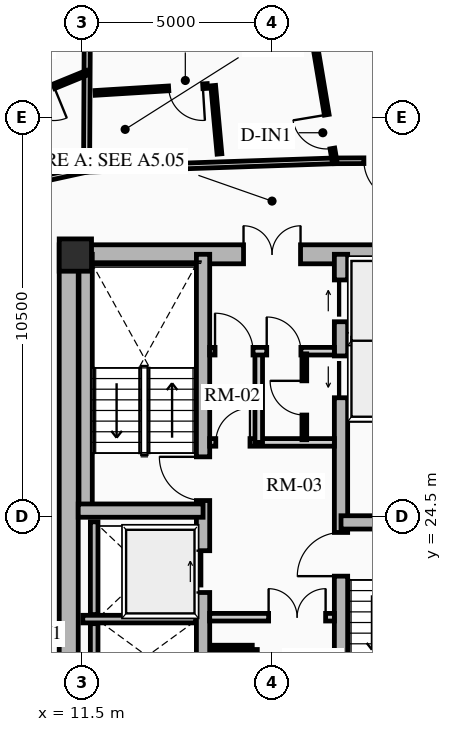
"""IFC4 building model, lengths in metres.
Left out: names, types, materials, properties, quantities, classifications, styles, units other than length and angle.
Written with IfcOpenShell. Run it as: python <this file> out.ifc"""

import sys

from ifc_helpers import new_model, si_unit, direction, frame, frame_2d, origin, origin_2d, place, context, subcontext, project, spatial, rectangle, extrude, source, transform, mapped, element, fill, save


model = new_model("IFC4")
c1 = context("Model", 3, precision=1e-05, world=origin(), true_north=direction((0.0, 1.0)))
c2 = subcontext(c1, "Body", "Model", "MODEL_VIEW")
j1 = project(units=[si_unit("LENGTHUNIT", "METRE"), si_unit("PLANEANGLEUNIT", "RADIAN")], contexts=[c1])
p1 = place(None, origin())
s1 = spatial("IfcSite", under=j1, at=p1, CompositionType="ELEMENT")
p2 = place(p1, origin())
s2 = spatial("IfcBuilding", under=s1, at=p2, CompositionType="ELEMENT")
p3 = place(p2, frame((0.0, 0.0, 62.74)))
s3 = spatial("IfcBuildingStorey", under=s2, at=p3, CompositionType="ELEMENT", Elevation=62.74)
p4 = place(p3, frame((11.15, 17.35, 0.0), z_axis=(0.0, 0.0, 1.0), x_axis=(0.0, 1.0, 0.0)))
e1 = element("IfcWall", 1, at=p4, inside=s3, PredefinedType="SHEAR", context=c2, shape_type="SweptSolid", body=[
    extrude(rectangle(XDim=14.3, YDim=0.5, at=frame_2d((7.15, 0.0))), origin(), (0.0, 0.0, 1.0), 2.91),
])
p5 = place(p3, frame((11.15, 31.4, 0.0), z_axis=(0.0, 0.0, 1.0), x_axis=(1.0, 0.0, 0.0)))
e2 = element("IfcWall", 2, at=p5, inside=s3, PredefinedType="SHEAR", context=c2, shape_type="SweptSolid", body=[
    extrude(rectangle(XDim=10.7, YDim=0.5, at=frame_2d((5.35, 0.0))), origin(), (0.0, 0.0, 1.0), 2.91),
])
m1 = source(origin(), c2, "Body", "SweptSolid", [
    extrude(rectangle(XDim=1.5, YDim=2.02, at=frame_2d((0.75, 1.01))), frame((0.0, 0.26, 0.0), z_axis=(0.0, -1.0, 0.0), x_axis=(1.0, 0.0, 0.0)), (0.0, 0.0, 1.0), 0.52),
])
p6 = place(p5, frame((4.6, 0.0, 0.0)))
e3 = element("IfcOpeningElement", 3, at=p6, cuts=e2, PredefinedType="OPENING", context=c2, shape_type="MappedRepresentation", body=[
    mapped(m1, transform((0.0, 0.0, 0.0), x_axis=(1.0, 0.0, 0.0), y_axis=(0.0, 1.0, 0.0), z_axis=(0.0, 0.0, 1.0), scale=1.0)),
])
p7 = place(p3, frame((14.685, 17.6, 0.0), z_axis=(0.0, 0.0, 1.0), x_axis=(0.0, 1.0, 0.0)))
e4 = element("IfcWall", 4, at=p7, inside=s3, PredefinedType="SHEAR", context=c2, shape_type="SweptSolid", body=[
    extrude(rectangle(XDim=13.8, YDim=0.35, at=frame_2d((6.9, 0.0))), origin(), (0.0, 0.0, 1.0), 2.91),
])
m2 = source(origin(), c2, "Body", "SweptSolid", [
    extrude(rectangle(XDim=1.1, YDim=2.015, at=frame_2d((0.55, 1.007))), frame((0.0, 0.185, 0.0), z_axis=(0.0, -1.0, 0.0), x_axis=(1.0, 0.0, 0.0)), (0.0, 0.0, 1.0), 0.37),
])
p8 = place(p7, frame((4.9, 0.0, 0.0)))
e5 = element("IfcOpeningElement", 5, at=p8, cuts=e4, PredefinedType="OPENING", context=c2, shape_type="MappedRepresentation", body=[
    mapped(m2, transform((0.0, 0.0, 0.0), x_axis=(1.0, 0.0, 0.0), y_axis=(0.0, 1.0, 0.0), z_axis=(0.0, 0.0, 1.0), scale=1.0)),
])
m3 = source(origin(), c2, "Body", "SweptSolid", [
    extrude(rectangle(XDim=1.15, YDim=2.02, at=frame_2d((0.575, 1.01))), frame((0.0, 0.185, 0.0), z_axis=(0.0, -1.0, 0.0), x_axis=(1.0, 0.0, 0.0)), (0.0, 0.0, 1.0), 0.37),
])
p9 = place(p7, frame((7.32, 0.0, 0.0)))
e6 = element("IfcOpeningElement", 6, at=p9, cuts=e4, PredefinedType="OPENING", context=c2, shape_type="MappedRepresentation", body=[
    mapped(m3, transform((0.0, 0.0, 0.0), x_axis=(1.0, 0.0, 0.0), y_axis=(0.0, 1.0, 0.0), z_axis=(0.0, 0.0, 1.0), scale=1.0)),
])
p10 = place(p3, frame((18.315, 17.6, 0.0), z_axis=(0.0, 0.0, 1.0), x_axis=(0.0, 1.0, 0.0)))
e7 = element("IfcWall", 7, at=p10, inside=s3, PredefinedType="SHEAR", context=c2, shape_type="SweptSolid", body=[
    extrude(rectangle(XDim=13.8, YDim=0.35, at=frame_2d((6.9, 0.0))), origin(), (0.0, 0.0, 1.0), 2.91),
])
p11 = place(p10, frame((10.025, 0.0, 0.0)))
e8 = element("IfcOpeningElement", 8, at=p11, cuts=e7, PredefinedType="OPENING", context=c2, shape_type="MappedRepresentation", body=[
    mapped(m2, transform((0.0, 0.0, 0.0), x_axis=(1.0, 0.0, 0.0), y_axis=(0.0, 1.0, 0.0), z_axis=(0.0, 0.0, 1.0), scale=1.0)),
])
p12 = place(p10, frame((12.025, 0.0, 0.0)))
e9 = element("IfcOpeningElement", 9, at=p12, cuts=e7, PredefinedType="OPENING", context=c2, shape_type="MappedRepresentation", body=[
    mapped(m2, transform((0.0, 0.0, 0.0), x_axis=(1.0, 0.0, 0.0), y_axis=(0.0, 1.0, 0.0), z_axis=(0.0, 0.0, 1.0), scale=1.0)),
])
p13 = place(p10, frame((5.33, 0.0, 0.0)))
e10 = element("IfcOpeningElement", 10, at=p13, cuts=e7, PredefinedType="OPENING", context=c2, shape_type="MappedRepresentation", body=[
    mapped(m3, transform((0.0, 0.0, 0.0), x_axis=(1.0, 0.0, 0.0), y_axis=(0.0, 1.0, 0.0), z_axis=(0.0, 0.0, 1.0), scale=1.0)),
])
p14 = place(p3, frame((11.595, 24.655, 0.0), z_axis=(0.0, 0.0, 1.0), x_axis=(0.0, 1.0, 0.0)))
e11 = element("IfcWall", 11, at=p14, inside=s3, PredefinedType="SHEAR", context=c2, shape_type="SweptSolid", body=[
    extrude(rectangle(XDim=6.745, YDim=0.35, at=frame_2d((3.373, 0.0))), origin(), (0.0, 0.0, 1.0), 2.91),
])
for number, where, z_axis, x_axis in (
    (12, (11.4, 24.655, 0.0), (0.0, 0.0, 1.0), (1.0, 0.0, 0.0)),
    (13, (18.315, 24.345, 0.0), (0.0, 0.0, 1.0), (1.0, 0.0, 0.0)),
):
    element("IfcWall", number, at=place(p3, frame(where, z_axis=z_axis, x_axis=x_axis)), inside=s3, PredefinedType="SHEAR", context=c2, shape_type="SweptSolid", body=[
        extrude(rectangle(XDim=3.285, YDim=0.35, at=frame_2d((1.643, 0.0))), origin(), (0.0, 0.0, 1.0), 2.91),
    ])
p15 = place(p3, frame((11.325, 31.38, 0.0), z_axis=(0.0, 0.0, 1.0), x_axis=(1.0, 0.0, 0.0)))
e14 = element("IfcColumn", 14, at=p15, inside=s3, PredefinedType="COLUMN", context=c2, shape_type="SweptSolid", body=[
    extrude(rectangle(XDim=0.85, YDim=0.85, at=origin_2d()), origin(), (0.0, 0.0, 1.0), 2.91),
])
p16 = place(p3, frame((11.52, 21.8, 0.0), z_axis=(0.0, 0.0, 1.0), x_axis=(1.0, 0.0, 0.0)))
e15 = element("IfcWall", 15, at=p16, inside=s3, PredefinedType="SHEAR", context=c2, shape_type="SweptSolid", body=[
    extrude(rectangle(XDim=2.97, YDim=0.2, at=frame_2d((1.485, 0.0))), origin(), (0.0, 0.0, 1.0), 2.91),
])
p17 = place(p3, frame((11.82, 21.92, 0.0), z_axis=(0.0, 0.0, 1.0), x_axis=(0.0, 1.0, 0.0)))
e16 = element("IfcWall", 16, at=p17, inside=s3, PredefinedType="SHEAR", context=c2, shape_type="SweptSolid", body=[
    extrude(rectangle(XDim=2.44, YDim=0.2, at=frame_2d((1.22, 0.0))), origin(), (0.0, 0.0, 1.0), 2.91),
])
p18 = place(p3, frame((11.82, 19.945, 0.0), z_axis=(0.0, 0.0, 1.0), x_axis=(0.0, 1.0, 0.0)))
e17 = element("IfcWall", 17, at=p18, inside=s3, PredefinedType="SHEAR", context=c2, shape_type="SweptSolid", body=[
    extrude(rectangle(XDim=1.735, YDim=0.2, at=frame_2d((0.867, 0.0))), origin(), (0.0, 0.0, 1.0), 2.91),
])
for number, where, z_axis, x_axis in (
    (18, (18.51, 27.13, 0.0), (0.0, 0.0, 1.0), (1.0, 0.0, 0.0)),
    (19, (18.51, 29.175, 0.0), (0.0, 0.0, 1.0), (1.0, 0.0, 0.0)),
):
    element("IfcWall", number, at=place(p3, frame(where, z_axis=z_axis, x_axis=x_axis)), inside=s3, PredefinedType="SHEAR", context=c2, shape_type="SweptSolid", body=[
        extrude(rectangle(XDim=2.97, YDim=0.2, at=frame_2d((1.485, 0.0))), origin(), (0.0, 0.0, 1.0), 2.91),
    ])
p19 = place(p3, frame((14.86, 21.85, 0.0), z_axis=(0.0, 0.0, 1.0), x_axis=(1.0, 0.0, 0.0)))
e20 = element("IfcWall", 20, at=p19, inside=s3, PredefinedType="PARTITIONING", context=c2, shape_type="SweptSolid", body=[
    extrude(rectangle(XDim=3.28, YDim=0.2, at=frame_2d((1.64, 0.0))), origin(), (0.0, 0.0, 1.0), 2.555),
])
m4 = source(origin(), c2, "Body", "SweptSolid", [
    extrude(rectangle(XDim=1.5, YDim=2.02, at=frame_2d((0.75, 1.01))), frame((0.0, 0.11, 0.0), z_axis=(0.0, -1.0, 0.0), x_axis=(1.0, 0.0, 0.0)), (0.0, 0.0, 1.0), 0.22),
])
p20 = place(p19, frame((1.55, 0.0, 0.0)))
e21 = element("IfcOpeningElement", 21, at=p20, cuts=e20, PredefinedType="OPENING", context=c2, shape_type="MappedRepresentation", body=[
    mapped(m4, transform((0.0, 0.0, 0.0), x_axis=(1.0, 0.0, 0.0), y_axis=(0.0, 1.0, 0.0), z_axis=(0.0, 0.0, 1.0), scale=1.0)),
])
p21 = place(p3, frame((14.86, 26.45, 0.0), z_axis=(0.0, 0.0, 1.0), x_axis=(1.0, 0.0, 0.0)))
e22 = element("IfcWall", 22, at=p21, inside=s3, PredefinedType="PARTITIONING", context=c2, shape_type="SweptSolid", body=[
    extrude(rectangle(XDim=3.28, YDim=0.2, at=frame_2d((1.64, 0.0))), origin(), (0.0, 0.0, 1.0), 2.555),
])
m5 = source(origin(), c2, "Body", "SweptSolid", [
    extrude(rectangle(XDim=0.9, YDim=2.005, at=frame_2d((0.45, 1.002))), frame((0.0, 0.11, 0.0), z_axis=(0.0, -1.0, 0.0), x_axis=(1.0, 0.0, 0.0)), (0.0, 0.0, 1.0), 0.22),
])
p22 = place(p21, frame((0.16, 0.0, 0.0)))
e23 = element("IfcOpeningElement", 23, at=p22, cuts=e22, PredefinedType="OPENING", context=c2, shape_type="MappedRepresentation", body=[
    mapped(m5, transform((0.0, 0.0, 0.0), x_axis=(1.0, 0.0, 0.0), y_axis=(0.0, 1.0, 0.0), z_axis=(0.0, 0.0, 1.0), scale=1.0)),
])
p23 = place(p3, frame((16.15, 26.45, 0.0), z_axis=(0.0, 0.0, 1.0), x_axis=(0.0, 1.0, 0.0)))
e24 = element("IfcWall", 24, at=p23, inside=s3, PredefinedType="PARTITIONING", context=c2, shape_type="SweptSolid", body=[
    extrude(rectangle(XDim=2.4, YDim=0.2, at=frame_2d((1.2, 0.0))), origin(), (0.0, 0.0, 1.0), 2.555),
])
p24 = place(p3, frame((14.86, 28.85, 0.0), z_axis=(0.0, 0.0, 1.0), x_axis=(1.0, 0.0, 0.0)))
e25 = element("IfcWall", 25, at=p24, inside=s3, PredefinedType="PARTITIONING", context=c2, shape_type="SweptSolid", body=[
    extrude(rectangle(XDim=3.28, YDim=0.2, at=frame_2d((1.64, 0.0))), origin(), (0.0, 0.0, 1.0), 2.555),
])
m6 = source(origin(), c2, "Body", "SweptSolid", [
    extrude(rectangle(XDim=1.0, YDim=2.015, at=frame_2d((0.5, 1.007))), frame((0.0, 0.11, 0.0), z_axis=(0.0, -1.0, 0.0), x_axis=(1.0, 0.0, 0.0)), (0.0, 0.0, 1.0), 0.22),
])
p25 = place(p24, frame((0.14, 0.0, 0.0)))
e26 = element("IfcOpeningElement", 26, at=p25, cuts=e25, PredefinedType="OPENING", context=c2, shape_type="MappedRepresentation", body=[
    mapped(m6, transform((0.0, 0.0, 0.0), x_axis=(1.0, 0.0, 0.0), y_axis=(0.0, 1.0, 0.0), z_axis=(0.0, 0.0, 1.0), scale=1.0)),
])
p26 = place(p24, frame((1.5, 0.0, 0.0)))
e27 = element("IfcOpeningElement", 27, at=p26, cuts=e25, PredefinedType="OPENING", context=c2, shape_type="MappedRepresentation", body=[
    mapped(m5, transform((0.0, 0.0, 0.0), x_axis=(1.0, 0.0, 0.0), y_axis=(0.0, 1.0, 0.0), z_axis=(0.0, 0.0, 1.0), scale=1.0)),
])
p27 = place(p3, frame((16.05, 17.92, 0.0), z_axis=(0.0, 0.0, 1.0), x_axis=(0.0, 1.0, 0.0)))
e28 = element("IfcWall", 28, at=p27, inside=s3, PredefinedType="PARTITIONING", context=c2, shape_type="SweptSolid", body=[
    extrude(rectangle(XDim=3.08, YDim=0.125, at=frame_2d((1.54, 0.0))), origin(), (0.0, 0.0, 1.0), 2.555),
])
m7 = source(origin(), c2, "Body", "SweptSolid", [
    extrude(rectangle(XDim=0.9, YDim=2.005, at=frame_2d((0.45, 1.002))), frame((0.0, 0.073, 0.0), z_axis=(0.0, -1.0, 0.0), x_axis=(1.0, 0.0, 0.0)), (0.0, 0.0, 1.0), 0.145),
])
p28 = place(p27, frame((1.05, 0.0, 0.0)))
e29 = element("IfcOpeningElement", 29, at=p28, cuts=e28, PredefinedType="OPENING", context=c2, shape_type="MappedRepresentation", body=[
    mapped(m7, transform((0.0, 0.0, 0.0), x_axis=(1.0, 0.0, 0.0), y_axis=(0.0, 1.0, 0.0), z_axis=(0.0, 0.0, 1.0), scale=1.0)),
])
p29 = place(p3, frame((14.88, 21.05, 0.0), z_axis=(0.0, 0.0, 1.0), x_axis=(1.0, 0.0, 0.0)))
e30 = element("IfcWall", 30, at=p29, inside=s3, PredefinedType="PARTITIONING", context=c2, shape_type="SweptSolid", body=[
    extrude(rectangle(XDim=1.1, YDim=0.125, at=frame_2d((0.55, 0.0))), origin(), (0.0, 0.0, 1.0), 2.555),
])
p30 = place(p3, frame((17.35, 26.52, 0.0), z_axis=(0.0, 0.0, 1.0), x_axis=(0.0, 1.0, 0.0)))
e31 = element("IfcWall", 31, at=p30, inside=s3, PredefinedType="PARTITIONING", context=c2, shape_type="SweptSolid", body=[
    extrude(rectangle(XDim=2.26, YDim=0.125, at=frame_2d((1.13, 0.0))), origin(), (0.0, 0.0, 1.0), 2.555),
])
p31 = place(p30, frame((0.65, 0.0, 0.0)))
e32 = element("IfcOpeningElement", 32, at=p31, cuts=e31, PredefinedType="OPENING", context=c2, shape_type="MappedRepresentation", body=[
    mapped(m7, transform((0.0, 0.0, 0.0), x_axis=(1.0, 0.0, 0.0), y_axis=(0.0, 1.0, 0.0), z_axis=(0.0, 0.0, 1.0), scale=1.0)),
])
p32 = place(p3, frame((21.527, 33.873, 0.0), z_axis=(0.0, 0.0, 1.0), x_axis=(-0.999991838845, -0.004040079574, 0.0)))
e33 = element("IfcWall", 33, at=p32, inside=s3, PredefinedType="PARTITIONING", context=c2, shape_type="SweptSolid", body=[
    extrude(rectangle(XDim=3.384, YDim=0.15, at=frame_2d((1.692, 0.0))), origin(), (0.0, 0.0, 1.0), 2.079),
])
m8 = source(origin(), c2, "Body", "SweptSolid", [
    extrude(rectangle(XDim=1.05, YDim=2.015, at=frame_2d((0.525, 1.007))), frame((0.0, 0.085, 0.0), z_axis=(0.0, -1.0, 0.0), x_axis=(1.0, 0.0, 0.0)), (0.0, 0.0, 1.0), 0.17),
])
p33 = place(p32, frame((1.56, 0.0, 0.0)))
e34 = element("IfcOpeningElement", 34, at=p33, cuts=e33, PredefinedType="OPENING", context=c2, shape_type="MappedRepresentation", body=[
    mapped(m8, transform((0.0, 0.0, 0.0), x_axis=(1.0, 0.0, 0.0), y_axis=(0.0, 1.0, 0.0), z_axis=(0.0, 0.0, 1.0), scale=1.0)),
])
p34 = place(p3, frame((18.143, 33.86, 0.0), z_axis=(0.0, 0.0, 1.0), x_axis=(-0.999419208319, -0.034077060363, 0.0)))
e35 = element("IfcWall", 35, at=p34, inside=s3, PredefinedType="PARTITIONING", context=c2, shape_type="SweptSolid", body=[
    extrude(rectangle(XDim=6.527, YDim=0.15, at=frame_2d((3.263, 0.0))), origin(), (0.0, 0.0, 1.0), 2.079),
])
p35 = place(p3, frame((11.62, 33.637, 0.0), z_axis=(0.0, 0.0, 1.0), x_axis=(-0.97702579435, -0.213121085711, 0.0)))
e36 = element("IfcWall", 36, at=p35, inside=s3, PredefinedType="PARTITIONING", context=c2, shape_type="SweptSolid", body=[
    extrude(rectangle(XDim=1.935, YDim=0.15, at=frame_2d((0.967, 0.0))), origin(), (0.0, 0.0, 1.0), 2.079),
])
p36 = place(p3, frame((11.62, 33.637, 0.0), z_axis=(0.0, 0.0, 1.0), x_axis=(0.00508426969, 0.999987075017, 0.0)))
e37 = element("IfcWall", 37, at=p36, inside=s3, PredefinedType="PARTITIONING", context=c2, shape_type="SweptSolid", body=[
    extrude(rectangle(XDim=9.075, YDim=0.16, at=frame_2d((4.538, 0.0))), origin(), (0.0, 0.0, 1.0), 2.079),
])
p37 = place(p3, frame((18.143, 33.86, 0.0), z_axis=(0.0, 0.0, 1.0), x_axis=(-0.165487634719, 0.986211865045, 0.0)))
e38 = element("IfcWall", 38, at=p37, inside=s3, PredefinedType="PARTITIONING", context=c2, shape_type="SweptSolid", body=[
    extrude(rectangle(XDim=9.927, YDim=0.125, at=frame_2d((4.964, 0.0))), origin(), (0.0, 0.0, 1.0), 2.079),
])
p38 = place(p37, frame((0.33, 0.0, 0.0)))
e39 = element("IfcOpeningElement", 39, at=p38, cuts=e38, PredefinedType="OPENING", context=c2, shape_type="MappedRepresentation", body=[
    mapped(m7, transform((0.0, 0.0, 0.0), x_axis=(1.0, 0.0, 0.0), y_axis=(0.0, 1.0, 0.0), z_axis=(0.0, 0.0, 1.0), scale=1.0)),
])
p39 = place(p3, frame((15.116, 34.041, 0.0), z_axis=(0.0, 0.0, 1.0), x_axis=(-0.091011265315, 0.995849862974, 0.0)))
e40 = element("IfcWall", 40, at=p39, inside=s3, PredefinedType="PARTITIONING", context=c2, shape_type="SweptSolid", body=[
    extrude(rectangle(XDim=1.805, YDim=0.125, at=frame_2d((0.903, 0.0))), origin(), (0.0, 0.0, 1.0), 2.555),
])
p40 = place(p3, frame((14.798, 35.829, 0.0), z_axis=(0.0, 0.0, 1.0), x_axis=(-0.998098224752, -0.061643602637, 0.0)))
e41 = element("IfcWall", 41, at=p40, inside=s3, PredefinedType="PARTITIONING", context=c2, shape_type="SweptSolid", body=[
    extrude(rectangle(XDim=2.958, YDim=0.125, at=frame_2d((1.479, 0.0))), origin(), (0.0, 0.0, 1.0), 2.079),
])
p41 = place(p40, frame((0.12, 0.0, 0.0)))
e42 = element("IfcOpeningElement", 42, at=p41, cuts=e41, PredefinedType="OPENING", context=c2, shape_type="MappedRepresentation", body=[
    mapped(m7, transform((0.0, 0.0, 0.0), x_axis=(1.0, 0.0, 0.0), y_axis=(0.0, 1.0, 0.0), z_axis=(0.0, 0.0, 1.0), scale=1.0)),
])
p42 = place(p3, frame((11.633, 36.178, 0.0), z_axis=(0.0, 0.0, 1.0), x_axis=(-0.92528752303, -0.379266396779, 0.0)))
e43 = element("IfcWall", 43, at=p42, inside=s3, PredefinedType="PARTITIONING", context=c2, shape_type="SweptSolid", body=[
    extrude(rectangle(XDim=2.791, YDim=0.125, at=frame_2d((1.395, 0.0))), origin(), (0.0, 0.0, 1.0), 2.079),
])
p43 = place(p42, frame((0.945, 0.0, 0.0)))
e44 = element("IfcOpeningElement", 44, at=p43, cuts=e43, PredefinedType="OPENING", context=c2, shape_type="MappedRepresentation", body=[
    mapped(m7, transform((0.0, 0.0, 0.0), x_axis=(1.0, 0.0, 0.0), y_axis=(0.0, 1.0, 0.0), z_axis=(0.0, 0.0, 1.0), scale=1.0)),
])
m9 = source(origin(), c2, "Body", "SweptSolid", [
    extrude(rectangle(XDim=1.1, YDim=2.015, at=frame_2d((0.55, 1.007))), frame((0.0, 0.025, 0.0), z_axis=(0.0, -1.0, 0.0), x_axis=(1.0, 0.0, 0.0)), (0.0, 0.0, 1.0), 0.05),
])
p44 = place(p8, origin())
e45 = element("IfcDoor", 45, at=p44, inside=s3, OperationType="SLIDING_TO_RIGHT", PredefinedType="DOOR", context=c2, shape_type="MappedRepresentation", body=[
    mapped(m9, transform((0.0, 0.0, 0.0), x_axis=(1.0, 0.0, 0.0), y_axis=(0.0, 1.0, 0.0), z_axis=(0.0, 0.0, 1.0), scale=1.0)),
])
fill(e5, e45)
p45 = place(p11, origin())
e46 = element("IfcDoor", 46, at=p45, inside=s3, OperationType="SLIDING_TO_LEFT", PredefinedType="DOOR", context=c2, shape_type="MappedRepresentation", body=[
    mapped(m9, transform((0.0, 0.0, 0.0), x_axis=(1.0, 0.0, 0.0), y_axis=(0.0, 1.0, 0.0), z_axis=(0.0, 0.0, 1.0), scale=1.0)),
])
fill(e8, e46)
p46 = place(p12, origin())
e47 = element("IfcDoor", 47, at=p46, inside=s3, OperationType="SLIDING_TO_RIGHT", PredefinedType="DOOR", context=c2, shape_type="MappedRepresentation", body=[
    mapped(m9, transform((0.0, 0.0, 0.0), x_axis=(1.0, 0.0, 0.0), y_axis=(0.0, 1.0, 0.0), z_axis=(0.0, 0.0, 1.0), scale=1.0)),
])
fill(e9, e47)
m10 = source(origin(), c2, "Body", "SweptSolid", [
    extrude(rectangle(XDim=1.15, YDim=2.02, at=frame_2d((0.575, 1.01))), frame((0.0, 0.025, 0.0), z_axis=(0.0, -1.0, 0.0), x_axis=(1.0, 0.0, 0.0)), (0.0, 0.0, 1.0), 0.05),
])
p47 = place(p9, origin())
e48 = element("IfcDoor", 48, at=p47, inside=s3, OperationType="SINGLE_SWING_RIGHT", PredefinedType="DOOR", context=c2, shape_type="MappedRepresentation", body=[
    mapped(m10, transform((0.0, 0.0, 0.0), x_axis=(1.0, 0.0, 0.0), y_axis=(0.0, 1.0, 0.0), z_axis=(0.0, 0.0, 1.0), scale=1.0)),
])
fill(e6, e48)
p48 = place(p13, origin())
e49 = element("IfcDoor", 49, at=p48, inside=s3, OperationType="SINGLE_SWING_LEFT", PredefinedType="DOOR", context=c2, shape_type="MappedRepresentation", body=[
    mapped(m10, transform((0.0, 0.0, 0.0), x_axis=(1.0, 0.0, 0.0), y_axis=(0.0, 1.0, 0.0), z_axis=(0.0, 0.0, 1.0), scale=1.0)),
])
fill(e10, e49)
m11 = source(origin(), c2, "Body", "SweptSolid", [
    extrude(rectangle(XDim=1.5, YDim=2.02, at=frame_2d((0.75, 1.01))), frame((0.0, 0.025, 0.0), z_axis=(0.0, -1.0, 0.0), x_axis=(1.0, 0.0, 0.0)), (0.0, 0.0, 1.0), 0.05),
])
p49 = place(p6, origin())
e50 = element("IfcDoor", 50, at=p49, inside=s3, OperationType="DOUBLE_DOOR_SINGLE_SWING", PredefinedType="DOOR", context=c2, shape_type="MappedRepresentation", body=[
    mapped(m11, transform((0.0, 0.0, 0.0), x_axis=(1.0, 0.0, 0.0), y_axis=(0.0, 1.0, 0.0), z_axis=(0.0, 0.0, 1.0), scale=1.0)),
])
fill(e3, e50)
p50 = place(p20, origin())
e51 = element("IfcDoor", 51, at=p50, inside=s3, OperationType="DOUBLE_DOOR_SINGLE_SWING", PredefinedType="DOOR", context=c2, shape_type="MappedRepresentation", body=[
    mapped(m11, transform((0.0, 0.0, 0.0), x_axis=(1.0, 0.0, 0.0), y_axis=(0.0, 1.0, 0.0), z_axis=(0.0, 0.0, 1.0), scale=1.0)),
])
fill(e21, e51)
m12 = source(origin(), c2, "Body", "SweptSolid", [
    extrude(rectangle(XDim=0.9, YDim=2.005, at=frame_2d((0.45, 1.002))), frame((0.0, 0.025, 0.0), z_axis=(0.0, -1.0, 0.0), x_axis=(1.0, 0.0, 0.0)), (0.0, 0.0, 1.0), 0.05),
])
p51 = place(p22, origin())
e52 = element("IfcDoor", 52, at=p51, inside=s3, OperationType="SINGLE_SWING_RIGHT", PredefinedType="DOOR", context=c2, shape_type="MappedRepresentation", body=[
    mapped(m12, transform((0.0, 0.0, 0.0), x_axis=(1.0, 0.0, 0.0), y_axis=(0.0, 1.0, 0.0), z_axis=(0.0, 0.0, 1.0), scale=1.0)),
])
fill(e23, e52)
m13 = source(origin(), c2, "Body", "SweptSolid", [
    extrude(rectangle(XDim=1.0, YDim=2.015, at=frame_2d((0.5, 1.007))), frame((0.0, 0.025, 0.0), z_axis=(0.0, -1.0, 0.0), x_axis=(1.0, 0.0, 0.0)), (0.0, 0.0, 1.0), 0.05),
])
p52 = place(p25, origin())
e53 = element("IfcDoor", 53, at=p52, inside=s3, OperationType="SINGLE_SWING_LEFT", PredefinedType="DOOR", context=c2, shape_type="MappedRepresentation", body=[
    mapped(m13, transform((0.0, 0.0, 0.0), x_axis=(1.0, 0.0, 0.0), y_axis=(0.0, 1.0, 0.0), z_axis=(0.0, 0.0, 1.0), scale=1.0)),
])
fill(e26, e53)
p53 = place(p26, origin())
e54 = element("IfcDoor", 54, at=p53, inside=s3, OperationType="SINGLE_SWING_LEFT", PredefinedType="DOOR", context=c2, shape_type="MappedRepresentation", body=[
    mapped(m12, transform((0.0, 0.0, 0.0), x_axis=(1.0, 0.0, 0.0), y_axis=(0.0, 1.0, 0.0), z_axis=(0.0, 0.0, 1.0), scale=1.0)),
])
fill(e27, e54)
p54 = place(p31, origin())
e55 = element("IfcDoor", 55, at=p54, inside=s3, OperationType="SINGLE_SWING_RIGHT", PredefinedType="DOOR", context=c2, shape_type="MappedRepresentation", body=[
    mapped(m12, transform((0.0, 0.0, 0.0), x_axis=(1.0, 0.0, 0.0), y_axis=(0.0, 1.0, 0.0), z_axis=(0.0, 0.0, 1.0), scale=1.0)),
])
fill(e32, e55)
m14 = source(origin(), c2, "Body", "SweptSolid", [
    extrude(rectangle(XDim=1.05, YDim=2.015, at=frame_2d((0.525, 1.007))), frame((0.0, 0.025, 0.0), z_axis=(0.0, -1.0, 0.0), x_axis=(1.0, 0.0, 0.0)), (0.0, 0.0, 1.0), 0.05),
])
p55 = place(p33, origin())
e56 = element("IfcDoor", 56, at=p55, inside=s3, OperationType="SINGLE_SWING_LEFT", PredefinedType="DOOR", context=c2, shape_type="MappedRepresentation", body=[
    mapped(m14, transform((0.0, 0.0, 0.0), x_axis=(1.0, 0.0, 0.0), y_axis=(0.0, 1.0, 0.0), z_axis=(0.0, 0.0, 1.0), scale=1.0)),
])
fill(e34, e56)
p56 = place(p38, origin())
e57 = element("IfcDoor", 57, at=p56, inside=s3, OperationType="SINGLE_SWING_RIGHT", PredefinedType="DOOR", context=c2, shape_type="MappedRepresentation", body=[
    mapped(m12, transform((0.0, 0.0, 0.0), x_axis=(1.0, 0.0, 0.0), y_axis=(0.0, 1.0, 0.0), z_axis=(0.0, 0.0, 1.0), scale=1.0)),
])
fill(e39, e57)
p57 = place(p41, origin())
e58 = element("IfcDoor", 58, at=p57, inside=s3, OperationType="SINGLE_SWING_LEFT", PredefinedType="DOOR", context=c2, shape_type="MappedRepresentation", body=[
    mapped(m12, transform((0.0, 0.0, 0.0), x_axis=(1.0, 0.0, 0.0), y_axis=(0.0, 1.0, 0.0), z_axis=(0.0, 0.0, 1.0), scale=1.0)),
])
fill(e42, e58)
p58 = place(p43, origin())
e59 = element("IfcDoor", 59, at=p58, inside=s3, OperationType="SINGLE_SWING_LEFT", PredefinedType="DOOR", context=c2, shape_type="MappedRepresentation", body=[
    mapped(m12, transform((0.0, 0.0, 0.0), x_axis=(1.0, 0.0, 0.0), y_axis=(0.0, 1.0, 0.0), z_axis=(0.0, 0.0, 1.0), scale=1.0)),
])
fill(e44, e59)
save(model, sys.argv[1])
